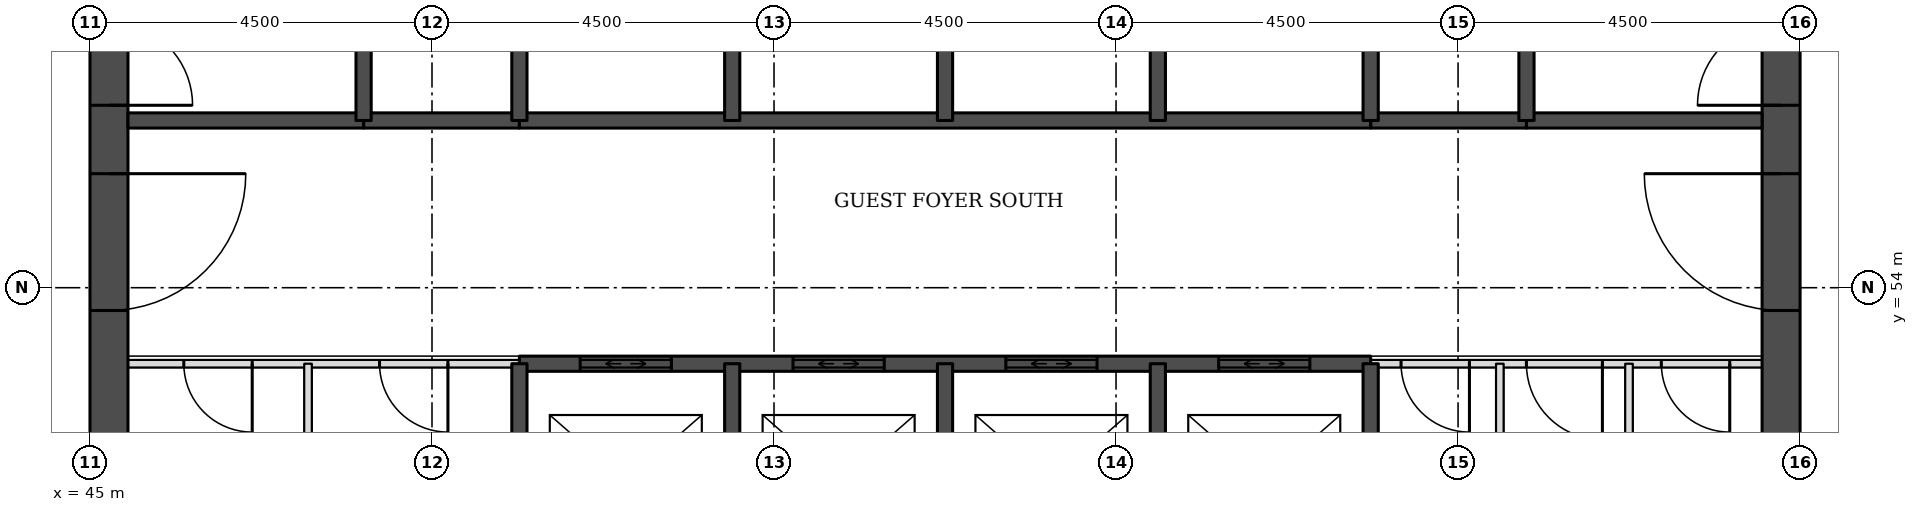
"""IFC4 building model, lengths in metres.
Left out: names, types, materials, properties, quantities, classifications, styles, units other than length and angle.
Written with IfcOpenShell. Run it as: python <this file> out.ifc"""

import sys

from ifc_helpers import new_model, si_unit, direction, frame, frame_2d, origin, place, context, subcontext, project, spatial, rectangle, extrude, element, fill, save


model = new_model("IFC4")
c1 = context("Model", 3, precision=1e-05, world=origin(), true_north=direction((0.0, 1.0)))
c2 = subcontext(c1, "Body", "Model", "MODEL_VIEW")
j1 = project(units=[si_unit("LENGTHUNIT", "METRE"), si_unit("PLANEANGLEUNIT", "RADIAN")], contexts=[c1])
p1 = place(None, origin())
s1 = spatial("IfcSite", under=j1, at=p1, CompositionType="ELEMENT")
p2 = place(p1, origin())
s2 = spatial("IfcBuilding", under=s1, at=p2, CompositionType="ELEMENT")
p3 = place(p2, frame((0.0, 0.0, 29.7)))
s3 = spatial("IfcBuildingStorey", under=s2, at=p3, CompositionType="ELEMENT", Elevation=29.7)
p4 = place(p3, frame((45.25, 49.5, 0.0), z_axis=(0.0, 0.0, 1.0), x_axis=(0.0, 1.0, 0.0)))
e1 = element("IfcWall", 1, at=p4, inside=s3, PredefinedType="SHEAR", context=c2, shape_type="SweptSolid", body=[
    extrude(rectangle(XDim=22.5, YDim=0.5, at=frame_2d((11.25, 0.0))), origin(), (0.0, 0.0, 1.0), 3.3),
])
p5 = place(p4, frame((4.2, 0.0, 0.0)))
e2 = element("IfcOpeningElement", 2, at=p5, cuts=e1, PredefinedType="OPENING", context=c2, shape_type="SweptSolid", body=[
    extrude(rectangle(XDim=1.8, YDim=2.1, at=frame_2d((0.9, 1.05))), frame((0.0, 0.26, 0.0), z_axis=(0.0, -1.0, 0.0), x_axis=(1.0, 0.0, 0.0)), (0.0, 0.0, 1.0), 0.52),
])
p6 = place(p4, frame((6.9, 0.0, 0.0)))
e3 = element("IfcOpeningElement", 3, at=p6, cuts=e1, PredefinedType="OPENING", context=c2, shape_type="SweptSolid", body=[
    extrude(rectangle(XDim=1.1, YDim=2.1, at=frame_2d((0.55, 1.05))), frame((0.0, 0.26, 0.0), z_axis=(0.0, -1.0, 0.0), x_axis=(1.0, 0.0, 0.0)), (0.0, 0.0, 1.0), 0.52),
])
p7 = place(p4, frame((13.6, 0.0, 0.0)))
e4 = element("IfcOpeningElement", 4, at=p7, cuts=e1, PredefinedType="OPENING", context=c2, shape_type="SweptSolid", body=[
    extrude(rectangle(XDim=1.1, YDim=2.1, at=frame_2d((0.55, 1.05))), frame((0.0, 0.26, 0.0), z_axis=(0.0, -1.0, 0.0), x_axis=(1.0, 0.0, 0.0)), (0.0, 0.0, 1.0), 0.52),
])
p8 = place(p4, frame((16.5, 0.0, 0.0)))
e5 = element("IfcOpeningElement", 5, at=p8, cuts=e1, PredefinedType="OPENING", context=c2, shape_type="SweptSolid", body=[
    extrude(rectangle(XDim=1.8, YDim=2.1, at=frame_2d((0.9, 1.05))), frame((0.0, 0.26, 0.0), z_axis=(0.0, -1.0, 0.0), x_axis=(1.0, 0.0, 0.0)), (0.0, 0.0, 1.0), 0.52),
])
p9 = place(p3, frame((67.25, 49.5, 0.0), z_axis=(0.0, 0.0, 1.0), x_axis=(0.0, 1.0, 0.0)))
e6 = element("IfcWall", 6, at=p9, inside=s3, PredefinedType="SHEAR", context=c2, shape_type="SweptSolid", body=[
    extrude(rectangle(XDim=22.5, YDim=0.5, at=frame_2d((11.25, 0.0))), origin(), (0.0, 0.0, 1.0), 3.3),
])
p10 = place(p9, frame((4.2, 0.0, 0.0)))
e7 = element("IfcOpeningElement", 7, at=p10, cuts=e6, PredefinedType="OPENING", context=c2, shape_type="SweptSolid", body=[
    extrude(rectangle(XDim=1.8, YDim=2.1, at=frame_2d((0.9, 1.05))), frame((0.0, 0.26, 0.0), z_axis=(0.0, -1.0, 0.0), x_axis=(1.0, 0.0, 0.0)), (0.0, 0.0, 1.0), 0.52),
])
p11 = place(p9, frame((6.9, 0.0, 0.0)))
e8 = element("IfcOpeningElement", 8, at=p11, cuts=e6, PredefinedType="OPENING", context=c2, shape_type="SweptSolid", body=[
    extrude(rectangle(XDim=1.1, YDim=2.1, at=frame_2d((0.55, 1.05))), frame((0.0, 0.26, 0.0), z_axis=(0.0, -1.0, 0.0), x_axis=(1.0, 0.0, 0.0)), (0.0, 0.0, 1.0), 0.52),
])
p12 = place(p9, frame((13.6, 0.0, 0.0)))
e9 = element("IfcOpeningElement", 9, at=p12, cuts=e6, PredefinedType="OPENING", context=c2, shape_type="SweptSolid", body=[
    extrude(rectangle(XDim=1.1, YDim=2.1, at=frame_2d((0.55, 1.05))), frame((0.0, 0.26, 0.0), z_axis=(0.0, -1.0, 0.0), x_axis=(1.0, 0.0, 0.0)), (0.0, 0.0, 1.0), 0.52),
])
p13 = place(p9, frame((16.5, 0.0, 0.0)))
e10 = element("IfcOpeningElement", 10, at=p13, cuts=e6, PredefinedType="OPENING", context=c2, shape_type="SweptSolid", body=[
    extrude(rectangle(XDim=1.8, YDim=2.1, at=frame_2d((0.9, 1.05))), frame((0.0, 0.26, 0.0), z_axis=(0.0, -1.0, 0.0), x_axis=(1.0, 0.0, 0.0)), (0.0, 0.0, 1.0), 0.52),
])
p14 = place(p3, frame((45.5, 53.0, 0.0), z_axis=(0.0, 0.0, 1.0), x_axis=(1.0, 0.0, 0.0)))
e11 = element("IfcWall", 11, at=p14, inside=s3, PredefinedType="PARTITIONING", context=c2, shape_type="SweptSolid", body=[
    extrude(rectangle(XDim=5.15, YDim=0.1, at=frame_2d((2.575, 0.0))), origin(), (0.0, 0.0, 1.0), 3.08),
])
p15 = place(p14, frame((0.735, 0.0, 0.0)))
e12 = element("IfcOpeningElement", 12, at=p15, cuts=e11, PredefinedType="OPENING", context=c2, shape_type="SweptSolid", body=[
    extrude(rectangle(XDim=0.9, YDim=2.1, at=frame_2d((0.45, 1.05))), frame((0.0, 0.06, 0.0), z_axis=(0.0, -1.0, 0.0), x_axis=(1.0, 0.0, 0.0)), (0.0, 0.0, 1.0), 0.12),
])
p16 = place(p14, frame((3.31, 0.0, 0.0)))
e13 = element("IfcOpeningElement", 13, at=p16, cuts=e11, PredefinedType="OPENING", context=c2, shape_type="SweptSolid", body=[
    extrude(rectangle(XDim=0.9, YDim=2.1, at=frame_2d((0.45, 1.05))), frame((0.0, 0.06, 0.0), z_axis=(0.0, -1.0, 0.0), x_axis=(1.0, 0.0, 0.0)), (0.0, 0.0, 1.0), 0.12),
])
p17 = place(p3, frame((61.85, 53.0, 0.0), z_axis=(0.0, 0.0, 1.0), x_axis=(1.0, 0.0, 0.0)))
e14 = element("IfcWall", 14, at=p17, inside=s3, PredefinedType="PARTITIONING", context=c2, shape_type="SweptSolid", body=[
    extrude(rectangle(XDim=5.15, YDim=0.1, at=frame_2d((2.575, 0.0))), origin(), (0.0, 0.0, 1.0), 3.08),
])
p18 = place(p17, frame((3.824, 0.0, 0.0)))
e15 = element("IfcOpeningElement", 15, at=p18, cuts=e14, PredefinedType="OPENING", context=c2, shape_type="SweptSolid", body=[
    extrude(rectangle(XDim=0.9, YDim=2.1, at=frame_2d((0.45, 1.05))), frame((0.0, 0.06, 0.0), z_axis=(0.0, -1.0, 0.0), x_axis=(1.0, 0.0, 0.0)), (0.0, 0.0, 1.0), 0.12),
])
p19 = place(p17, frame((2.049, 0.0, 0.0)))
e16 = element("IfcOpeningElement", 16, at=p19, cuts=e14, PredefinedType="OPENING", context=c2, shape_type="SweptSolid", body=[
    extrude(rectangle(XDim=1.0, YDim=2.1, at=frame_2d((0.5, 1.05))), frame((0.0, 0.06, 0.0), z_axis=(0.0, -1.0, 0.0), x_axis=(1.0, 0.0, 0.0)), (0.0, 0.0, 1.0), 0.12),
])
p20 = place(p17, frame((0.4, 0.0, 0.0)))
e17 = element("IfcOpeningElement", 17, at=p20, cuts=e14, PredefinedType="OPENING", context=c2, shape_type="SweptSolid", body=[
    extrude(rectangle(XDim=0.9, YDim=2.1, at=frame_2d((0.45, 1.05))), frame((0.0, 0.06, 0.0), z_axis=(0.0, -1.0, 0.0), x_axis=(1.0, 0.0, 0.0)), (0.0, 0.0, 1.0), 0.12),
])
p21 = place(p3, frame((50.65, 53.0, 0.0), z_axis=(0.0, 0.0, 1.0), x_axis=(1.0, 0.0, 0.0)))
e18 = element("IfcWall", 18, at=p21, inside=s3, PredefinedType="SOLIDWALL", context=c2, shape_type="SweptSolid", body=[
    extrude(rectangle(XDim=11.2, YDim=0.2, at=frame_2d((5.6, 0.0))), origin(), (0.0, 0.0, 1.0), 3.08),
])
p22 = place(p21, frame((0.8, 0.0, 0.0)))
e19 = element("IfcOpeningElement", 19, at=p22, cuts=e18, PredefinedType="OPENING", context=c2, shape_type="SweptSolid", body=[
    extrude(rectangle(XDim=1.2, YDim=2.1, at=frame_2d((0.6, 1.05))), frame((0.0, 0.11, 0.0), z_axis=(0.0, -1.0, 0.0), x_axis=(1.0, 0.0, 0.0)), (0.0, 0.0, 1.0), 0.22),
])
p23 = place(p21, frame((3.6, 0.0, 0.0)))
e20 = element("IfcOpeningElement", 20, at=p23, cuts=e18, PredefinedType="OPENING", context=c2, shape_type="SweptSolid", body=[
    extrude(rectangle(XDim=1.2, YDim=2.1, at=frame_2d((0.6, 1.05))), frame((0.0, 0.11, 0.0), z_axis=(0.0, -1.0, 0.0), x_axis=(1.0, 0.0, 0.0)), (0.0, 0.0, 1.0), 0.22),
])
p24 = place(p21, frame((6.4, 0.0, 0.0)))
e21 = element("IfcOpeningElement", 21, at=p24, cuts=e18, PredefinedType="OPENING", context=c2, shape_type="SweptSolid", body=[
    extrude(rectangle(XDim=1.2, YDim=2.1, at=frame_2d((0.6, 1.05))), frame((0.0, 0.11, 0.0), z_axis=(0.0, -1.0, 0.0), x_axis=(1.0, 0.0, 0.0)), (0.0, 0.0, 1.0), 0.22),
])
p25 = place(p21, frame((9.2, 0.0, 0.0)))
e22 = element("IfcOpeningElement", 22, at=p25, cuts=e18, PredefinedType="OPENING", context=c2, shape_type="SweptSolid", body=[
    extrude(rectangle(XDim=1.2, YDim=2.1, at=frame_2d((0.6, 1.05))), frame((0.0, 0.11, 0.0), z_axis=(0.0, -1.0, 0.0), x_axis=(1.0, 0.0, 0.0)), (0.0, 0.0, 1.0), 0.22),
])
for number, where, z_axis, x_axis in (
    (23, (48.6, 56.2, 0.0), (0.0, 0.0, 1.0), (1.0, 0.0, 0.0)),
    (24, (61.85, 56.2, 0.0), (0.0, 0.0, 1.0), (1.0, 0.0, 0.0)),
):
    element("IfcWall", number, at=place(p3, frame(where, z_axis=z_axis, x_axis=x_axis)), inside=s3, PredefinedType="SOLIDWALL", context=c2, shape_type="SweptSolid", body=[
        extrude(rectangle(XDim=2.05, YDim=0.2, at=frame_2d((1.025, 0.0))), origin(), (0.0, 0.0, 1.0), 3.08),
    ])
p26 = place(p3, frame((45.5, 56.2, 0.0), z_axis=(0.0, 0.0, 1.0), x_axis=(1.0, 0.0, 0.0)))
e25 = element("IfcWall", 25, at=p26, inside=s3, PredefinedType="SOLIDWALL", context=c2, shape_type="SweptSolid", body=[
    extrude(rectangle(XDim=3.1, YDim=0.2, at=frame_2d((1.55, 0.0))), origin(), (0.0, 0.0, 1.0), 3.08),
])
p27 = place(p3, frame((50.65, 56.2, 0.0), z_axis=(0.0, 0.0, 1.0), x_axis=(1.0, 0.0, 0.0)))
e26 = element("IfcWall", 26, at=p27, inside=s3, PredefinedType="SOLIDWALL", context=c2, shape_type="SweptSolid", body=[
    extrude(rectangle(XDim=11.2, YDim=0.2, at=frame_2d((5.6, 0.0))), origin(), (0.0, 0.0, 1.0), 3.08),
])
p28 = place(p3, frame((63.9, 56.2, 0.0), z_axis=(0.0, 0.0, 1.0), x_axis=(1.0, 0.0, 0.0)))
e27 = element("IfcWall", 27, at=p28, inside=s3, PredefinedType="SOLIDWALL", context=c2, shape_type="SweptSolid", body=[
    extrude(rectangle(XDim=3.1, YDim=0.2, at=frame_2d((1.55, 0.0))), origin(), (0.0, 0.0, 1.0), 3.08),
])
p29 = place(p3, frame((47.869, 50.0, 0.0), z_axis=(0.0, 0.0, 1.0), x_axis=(0.0, 1.0, 0.0)))
e28 = element("IfcWall", 28, at=p29, inside=s3, PredefinedType="PARTITIONING", context=c2, shape_type="SweptSolid", body=[
    extrude(rectangle(XDim=3.0, YDim=0.1, at=frame_2d((1.5, 0.0))), origin(), (0.0, 0.0, 1.0), 3.08),
])
p30 = place(p3, frame((48.6, 56.2, 0.0), z_axis=(0.0, 0.0, 1.0), x_axis=(0.0, 1.0, 0.0)))
e29 = element("IfcWall", 29, at=p30, inside=s3, PredefinedType="SOLIDWALL", context=c2, shape_type="SweptSolid", body=[
    extrude(rectangle(XDim=5.8, YDim=0.2, at=frame_2d((2.9, 0.0))), origin(), (0.0, 0.0, 1.0), 3.08),
])
p31 = place(p3, frame((50.65, 50.0, 0.0), z_axis=(0.0, 0.0, 1.0), x_axis=(0.0, 1.0, 0.0)))
e30 = element("IfcWall", 30, at=p31, inside=s3, PredefinedType="SOLIDWALL", context=c2, shape_type="SweptSolid", body=[
    extrude(rectangle(XDim=3.0, YDim=0.2, at=frame_2d((1.5, 0.0))), origin(), (0.0, 0.0, 1.0), 3.08),
])
p32 = place(p3, frame((50.65, 56.2, 0.0), z_axis=(0.0, 0.0, 1.0), x_axis=(0.0, 1.0, 0.0)))
e31 = element("IfcWall", 31, at=p32, inside=s3, PredefinedType="SOLIDWALL", context=c2, shape_type="SweptSolid", body=[
    extrude(rectangle(XDim=2.8, YDim=0.2, at=frame_2d((1.4, 0.0))), origin(), (0.0, 0.0, 1.0), 3.08),
])
p33 = place(p3, frame((53.45, 50.0, 0.0), z_axis=(0.0, 0.0, 1.0), x_axis=(0.0, 1.0, 0.0)))
e32 = element("IfcWall", 32, at=p33, inside=s3, PredefinedType="SOLIDWALL", context=c2, shape_type="SweptSolid", body=[
    extrude(rectangle(XDim=3.0, YDim=0.2, at=frame_2d((1.5, 0.0))), origin(), (0.0, 0.0, 1.0), 3.08),
])
p34 = place(p3, frame((53.45, 56.2, 0.0), z_axis=(0.0, 0.0, 1.0), x_axis=(0.0, 1.0, 0.0)))
e33 = element("IfcWall", 33, at=p34, inside=s3, PredefinedType="SOLIDWALL", context=c2, shape_type="SweptSolid", body=[
    extrude(rectangle(XDim=2.8, YDim=0.2, at=frame_2d((1.4, 0.0))), origin(), (0.0, 0.0, 1.0), 3.08),
])
p35 = place(p3, frame((56.25, 50.0, 0.0), z_axis=(0.0, 0.0, 1.0), x_axis=(0.0, 1.0, 0.0)))
e34 = element("IfcWall", 34, at=p35, inside=s3, PredefinedType="SOLIDWALL", context=c2, shape_type="SweptSolid", body=[
    extrude(rectangle(XDim=3.0, YDim=0.2, at=frame_2d((1.5, 0.0))), origin(), (0.0, 0.0, 1.0), 3.08),
])
p36 = place(p3, frame((56.25, 56.2, 0.0), z_axis=(0.0, 0.0, 1.0), x_axis=(0.0, 1.0, 0.0)))
e35 = element("IfcWall", 35, at=p36, inside=s3, PredefinedType="SOLIDWALL", context=c2, shape_type="SweptSolid", body=[
    extrude(rectangle(XDim=2.8, YDim=0.2, at=frame_2d((1.4, 0.0))), origin(), (0.0, 0.0, 1.0), 3.08),
])
p37 = place(p3, frame((59.05, 50.0, 0.0), z_axis=(0.0, 0.0, 1.0), x_axis=(0.0, 1.0, 0.0)))
e36 = element("IfcWall", 36, at=p37, inside=s3, PredefinedType="SOLIDWALL", context=c2, shape_type="SweptSolid", body=[
    extrude(rectangle(XDim=3.0, YDim=0.2, at=frame_2d((1.5, 0.0))), origin(), (0.0, 0.0, 1.0), 3.08),
])
p38 = place(p3, frame((59.05, 56.2, 0.0), z_axis=(0.0, 0.0, 1.0), x_axis=(0.0, 1.0, 0.0)))
e37 = element("IfcWall", 37, at=p38, inside=s3, PredefinedType="SOLIDWALL", context=c2, shape_type="SweptSolid", body=[
    extrude(rectangle(XDim=2.8, YDim=0.2, at=frame_2d((1.4, 0.0))), origin(), (0.0, 0.0, 1.0), 3.08),
])
p39 = place(p3, frame((61.85, 50.0, 0.0), z_axis=(0.0, 0.0, 1.0), x_axis=(0.0, 1.0, 0.0)))
e38 = element("IfcWall", 38, at=p39, inside=s3, PredefinedType="SOLIDWALL", context=c2, shape_type="SweptSolid", body=[
    extrude(rectangle(XDim=3.0, YDim=0.2, at=frame_2d((1.5, 0.0))), origin(), (0.0, 0.0, 1.0), 3.08),
])
p40 = place(p3, frame((61.85, 56.2, 0.0), z_axis=(0.0, 0.0, 1.0), x_axis=(0.0, 1.0, 0.0)))
e39 = element("IfcWall", 39, at=p40, inside=s3, PredefinedType="SOLIDWALL", context=c2, shape_type="SweptSolid", body=[
    extrude(rectangle(XDim=2.8, YDim=0.2, at=frame_2d((1.4, 0.0))), origin(), (0.0, 0.0, 1.0), 3.08),
])
p41 = place(p3, frame((63.55, 50.0, 0.0), z_axis=(0.0, 0.0, 1.0), x_axis=(0.0, 1.0, 0.0)))
e40 = element("IfcWall", 40, at=p41, inside=s3, PredefinedType="PARTITIONING", context=c2, shape_type="SweptSolid", body=[
    extrude(rectangle(XDim=3.0, YDim=0.1, at=frame_2d((1.5, 0.0))), origin(), (0.0, 0.0, 1.0), 3.08),
])
p42 = place(p3, frame((63.9, 56.2, 0.0), z_axis=(0.0, 0.0, 1.0), x_axis=(0.0, 1.0, 0.0)))
e41 = element("IfcWall", 41, at=p42, inside=s3, PredefinedType="SOLIDWALL", context=c2, shape_type="SweptSolid", body=[
    extrude(rectangle(XDim=5.8, YDim=0.2, at=frame_2d((2.9, 0.0))), origin(), (0.0, 0.0, 1.0), 3.08),
])
p43 = place(p3, frame((65.249, 50.0, 0.0), z_axis=(0.0, 0.0, 1.0), x_axis=(0.0, 1.0, 0.0)))
e42 = element("IfcWall", 42, at=p43, inside=s3, PredefinedType="PARTITIONING", context=c2, shape_type="SweptSolid", body=[
    extrude(rectangle(XDim=3.0, YDim=0.1, at=frame_2d((1.5, 0.0))), origin(), (0.0, 0.0, 1.0), 3.08),
])
p44 = place(p22, origin())
e43 = element("IfcDoor", 43, at=p44, inside=s3, OperationType="DOUBLE_DOOR_SLIDING", PredefinedType="DOOR", context=c2, shape_type="SweptSolid", body=[
    extrude(rectangle(XDim=1.2, YDim=2.1, at=frame_2d((0.6, 1.05))), frame((0.0, 0.025, 0.0), z_axis=(0.0, -1.0, 0.0), x_axis=(1.0, 0.0, 0.0)), (0.0, 0.0, 1.0), 0.05),
])
fill(e19, e43)
p45 = place(p23, origin())
e44 = element("IfcDoor", 44, at=p45, inside=s3, OperationType="DOUBLE_DOOR_SLIDING", PredefinedType="DOOR", context=c2, shape_type="SweptSolid", body=[
    extrude(rectangle(XDim=1.2, YDim=2.1, at=frame_2d((0.6, 1.05))), frame((0.0, 0.025, 0.0), z_axis=(0.0, -1.0, 0.0), x_axis=(1.0, 0.0, 0.0)), (0.0, 0.0, 1.0), 0.05),
])
fill(e20, e44)
p46 = place(p24, origin())
e45 = element("IfcDoor", 45, at=p46, inside=s3, OperationType="DOUBLE_DOOR_SLIDING", PredefinedType="DOOR", context=c2, shape_type="SweptSolid", body=[
    extrude(rectangle(XDim=1.2, YDim=2.1, at=frame_2d((0.6, 1.05))), frame((0.0, 0.025, 0.0), z_axis=(0.0, -1.0, 0.0), x_axis=(1.0, 0.0, 0.0)), (0.0, 0.0, 1.0), 0.05),
])
fill(e21, e45)
p47 = place(p25, origin())
e46 = element("IfcDoor", 46, at=p47, inside=s3, OperationType="DOUBLE_DOOR_SLIDING", PredefinedType="DOOR", context=c2, shape_type="SweptSolid", body=[
    extrude(rectangle(XDim=1.2, YDim=2.1, at=frame_2d((0.6, 1.05))), frame((0.0, 0.025, 0.0), z_axis=(0.0, -1.0, 0.0), x_axis=(1.0, 0.0, 0.0)), (0.0, 0.0, 1.0), 0.05),
])
fill(e22, e46)
p48 = place(p5, frame((1.8, 0.0, 0.0), z_axis=(0.0, 0.0, 1.0), x_axis=(-1.0, 0.0, 0.0)))
e47 = element("IfcDoor", 47, at=p48, inside=s3, OperationType="SINGLE_SWING_LEFT", PredefinedType="DOOR", context=c2, shape_type="SweptSolid", body=[
    extrude(rectangle(XDim=1.8, YDim=2.1, at=frame_2d((0.9, 1.05))), frame((0.0, 0.025, 0.0), z_axis=(0.0, -1.0, 0.0), x_axis=(1.0, 0.0, 0.0)), (0.0, 0.0, 1.0), 0.05),
])
fill(e2, e47)
p49 = place(p6, frame((1.1, 0.0, 0.0), z_axis=(0.0, 0.0, 1.0), x_axis=(-1.0, 0.0, 0.0)))
e48 = element("IfcDoor", 48, at=p49, inside=s3, OperationType="SINGLE_SWING_RIGHT", PredefinedType="DOOR", context=c2, shape_type="SweptSolid", body=[
    extrude(rectangle(XDim=1.1, YDim=2.1, at=frame_2d((0.55, 1.05))), frame((0.0, 0.025, 0.0), z_axis=(0.0, -1.0, 0.0), x_axis=(1.0, 0.0, 0.0)), (0.0, 0.0, 1.0), 0.05),
])
fill(e3, e48)
p50 = place(p10, origin())
e49 = element("IfcDoor", 49, at=p50, inside=s3, OperationType="SINGLE_SWING_RIGHT", PredefinedType="DOOR", context=c2, shape_type="SweptSolid", body=[
    extrude(rectangle(XDim=1.8, YDim=2.1, at=frame_2d((0.9, 1.05))), frame((0.0, 0.025, 0.0), z_axis=(0.0, -1.0, 0.0), x_axis=(1.0, 0.0, 0.0)), (0.0, 0.0, 1.0), 0.05),
])
fill(e7, e49)
p51 = place(p11, origin())
e50 = element("IfcDoor", 50, at=p51, inside=s3, OperationType="SINGLE_SWING_LEFT", PredefinedType="DOOR", context=c2, shape_type="SweptSolid", body=[
    extrude(rectangle(XDim=1.1, YDim=2.1, at=frame_2d((0.55, 1.05))), frame((0.0, 0.025, 0.0), z_axis=(0.0, -1.0, 0.0), x_axis=(1.0, 0.0, 0.0)), (0.0, 0.0, 1.0), 0.05),
])
fill(e8, e50)
p52 = place(p18, frame((0.9, 0.0, 0.0), z_axis=(0.0, 0.0, 1.0), x_axis=(-1.0, 0.0, 0.0)))
e51 = element("IfcDoor", 51, at=p52, inside=s3, OperationType="SINGLE_SWING_LEFT", PredefinedType="DOOR", context=c2, shape_type="SweptSolid", body=[
    extrude(rectangle(XDim=0.9, YDim=2.1, at=frame_2d((0.45, 1.05))), frame((0.0, 0.025, 0.0), z_axis=(0.0, -1.0, 0.0), x_axis=(1.0, 0.0, 0.0)), (0.0, 0.0, 1.0), 0.05),
])
fill(e15, e51)
p53 = place(p19, frame((1.0, 0.0, 0.0), z_axis=(0.0, 0.0, 1.0), x_axis=(-1.0, 0.0, 0.0)))
e52 = element("IfcDoor", 52, at=p53, inside=s3, OperationType="SINGLE_SWING_LEFT", PredefinedType="DOOR", context=c2, shape_type="SweptSolid", body=[
    extrude(rectangle(XDim=1.0, YDim=2.1, at=frame_2d((0.5, 1.05))), frame((0.0, 0.025, 0.0), z_axis=(0.0, -1.0, 0.0), x_axis=(1.0, 0.0, 0.0)), (0.0, 0.0, 1.0), 0.05),
])
fill(e16, e52)
p54 = place(p20, frame((0.9, 0.0, 0.0), z_axis=(0.0, 0.0, 1.0), x_axis=(-1.0, 0.0, 0.0)))
e53 = element("IfcDoor", 53, at=p54, inside=s3, OperationType="SINGLE_SWING_LEFT", PredefinedType="DOOR", context=c2, shape_type="SweptSolid", body=[
    extrude(rectangle(XDim=0.9, YDim=2.1, at=frame_2d((0.45, 1.05))), frame((0.0, 0.025, 0.0), z_axis=(0.0, -1.0, 0.0), x_axis=(1.0, 0.0, 0.0)), (0.0, 0.0, 1.0), 0.05),
])
fill(e17, e53)
p55 = place(p15, frame((0.9, 0.0, 0.0), z_axis=(0.0, 0.0, 1.0), x_axis=(-1.0, 0.0, 0.0)))
e54 = element("IfcDoor", 54, at=p55, inside=s3, OperationType="SINGLE_SWING_LEFT", PredefinedType="DOOR", context=c2, shape_type="SweptSolid", body=[
    extrude(rectangle(XDim=0.9, YDim=2.1, at=frame_2d((0.45, 1.05))), frame((0.0, 0.025, 0.0), z_axis=(0.0, -1.0, 0.0), x_axis=(1.0, 0.0, 0.0)), (0.0, 0.0, 1.0), 0.05),
])
fill(e12, e54)
p56 = place(p16, frame((0.9, 0.0, 0.0), z_axis=(0.0, 0.0, 1.0), x_axis=(-1.0, 0.0, 0.0)))
e55 = element("IfcDoor", 55, at=p56, inside=s3, OperationType="SINGLE_SWING_LEFT", PredefinedType="DOOR", context=c2, shape_type="SweptSolid", body=[
    extrude(rectangle(XDim=0.9, YDim=2.1, at=frame_2d((0.45, 1.05))), frame((0.0, 0.025, 0.0), z_axis=(0.0, -1.0, 0.0), x_axis=(1.0, 0.0, 0.0)), (0.0, 0.0, 1.0), 0.05),
])
fill(e13, e55)
save(model, sys.argv[1])
